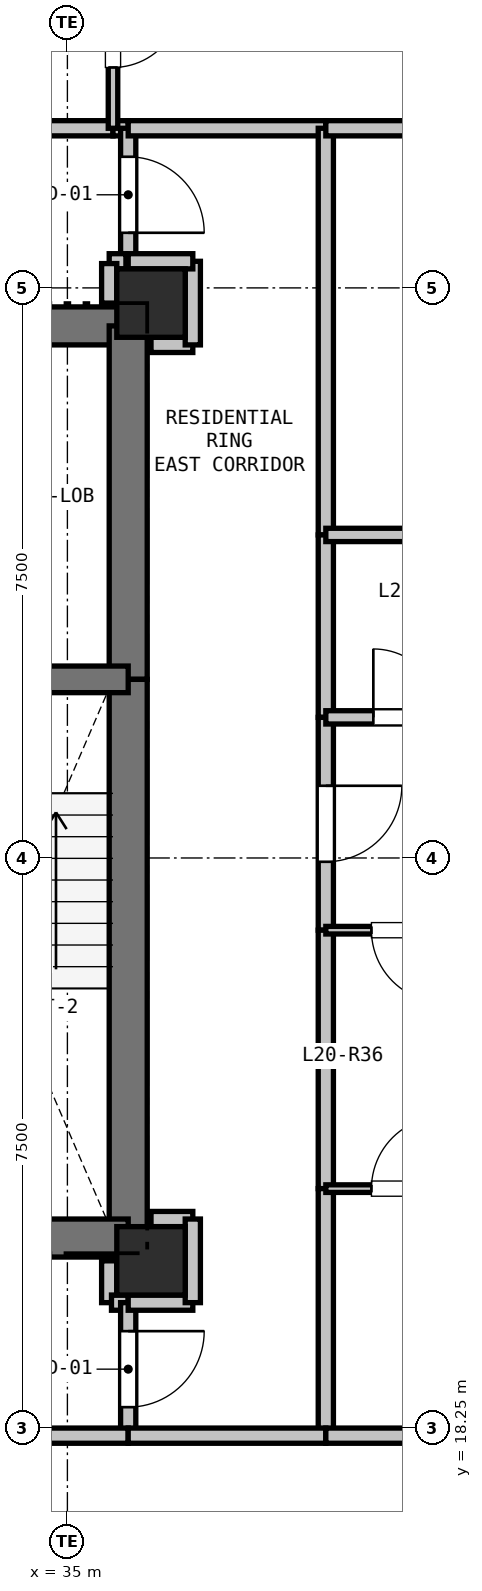
"""IFC4 building model, lengths in metres.
Left out: names, types, materials, properties, quantities, classifications, styles, units other than length and angle.
Written with IfcOpenShell. Run it as: python <this file> out.ifc"""

import sys

from ifc_helpers import new_model, si_unit, direction, frame, frame_2d, origin, origin_2d, place, context, subcontext, project, spatial, rectangle, extrude, element, fill, save


model = new_model("IFC4")
c1 = context("Model", 3, precision=1e-05, world=origin(), true_north=direction((0.0, 1.0)))
c2 = subcontext(c1, "Body", "Model", "MODEL_VIEW")
j1 = project(units=[si_unit("LENGTHUNIT", "METRE"), si_unit("PLANEANGLEUNIT", "RADIAN")], contexts=[c1])
p1 = place(None, origin())
s1 = spatial("IfcSite", under=j1, at=p1, CompositionType="ELEMENT")
p2 = place(p1, origin())
s2 = spatial("IfcBuilding", under=s1, at=p2, CompositionType="ELEMENT")
p3 = place(p2, frame((0.0, 0.0, 76.8)))
s3 = spatial("IfcBuildingStorey", under=s2, at=p3, CompositionType="ELEMENT", Elevation=76.8)
for number, where, z_axis, x_axis in (
    (1, (36.1, 33.05, 0.0), (0.0, 0.0, 1.0), (1.0, 0.0, 0.0)),
    (2, (36.1, 20.45, 0.0), (0.0, 0.0, 1.0), (1.0, 0.0, 0.0)),
):
    element("IfcColumn", number, at=place(p3, frame(where, z_axis=z_axis, x_axis=x_axis)), inside=s3, PredefinedType="COLUMN", context=c2, shape_type="SweptSolid", body=[
        extrude(rectangle(XDim=0.9, YDim=0.9, at=origin_2d()), origin(), (0.0, 0.0, 1.0), 3.3),
    ])
p4 = place(p3, frame((32.35, 32.75, 0.0), z_axis=(0.0, 0.0, 1.0), x_axis=(1.0, 0.0, 0.0)))
e3 = element("IfcWall", 3, at=p4, inside=s3, PredefinedType="SHEAR", context=c2, shape_type="SweptSolid", body=[
    extrude(rectangle(XDim=3.45, YDim=0.5, at=frame_2d((1.725, 0.0))), origin(), (0.0, 0.0, 1.0), 3.05),
])
p5 = place(p4, frame((0.65, 0.0, 0.0)))
e4 = element("IfcOpeningElement", 4, at=p5, cuts=e3, PredefinedType="OPENING", context=c2, shape_type="SweptSolid", body=[
    extrude(rectangle(XDim=1.15, YDim=2.15, at=frame_2d((0.575, 1.075))), frame((0.0, 0.26, 0.0), z_axis=(0.0, -1.0, 0.0), x_axis=(1.0, 0.0, 0.0)), (0.0, 0.0, 1.0), 0.52),
])
p6 = place(p3, frame((35.8, 32.75, 0.0), z_axis=(0.0, 0.0, 1.0), x_axis=(0.0, -1.0, 0.0)))
e5 = element("IfcWall", 5, at=p6, inside=s3, PredefinedType="SHEAR", context=c2, shape_type="SweptSolid", body=[
    extrude(rectangle(XDim=4.65, YDim=0.5, at=frame_2d((2.325, 0.0))), origin(), (0.0, 0.0, 1.0), 3.05),
])
p7 = place(p3, frame((35.8, 28.1, 0.0), z_axis=(0.0, 0.0, 1.0), x_axis=(0.0, -1.0, 0.0)))
e6 = element("IfcWall", 6, at=p7, inside=s3, PredefinedType="SHEAR", context=c2, shape_type="SweptSolid", body=[
    extrude(rectangle(XDim=7.35, YDim=0.5, at=frame_2d((3.675, 0.0))), origin(), (0.0, 0.0, 1.0), 3.05),
])
p8 = place(p3, frame((35.8, 20.75, 0.0), z_axis=(0.0, 0.0, 1.0), x_axis=(-1.0, 0.0, 0.0)))
e7 = element("IfcWall", 7, at=p8, inside=s3, PredefinedType="SHEAR", context=c2, shape_type="SweptSolid", body=[
    extrude(rectangle(XDim=3.45, YDim=0.5, at=frame_2d((1.725, 0.0))), origin(), (0.0, 0.0, 1.0), 3.05),
])
p9 = place(p3, frame((32.35, 28.1, 0.0), z_axis=(0.0, 0.0, 1.0), x_axis=(1.0, 0.0, 0.0)))
e8 = element("IfcWall", 8, at=p9, inside=s3, PredefinedType="SHEAR", context=c2, shape_type="SweptSolid", body=[
    extrude(rectangle(XDim=3.45, YDim=0.35, at=frame_2d((1.725, 0.0))), origin(), (0.0, 0.0, 1.0), 3.05),
])
p10 = place(p9, frame((1.15, 0.0, 0.0)))
e9 = element("IfcOpeningElement", 9, at=p10, cuts=e8, PredefinedType="OPENING", context=c2, shape_type="SweptSolid", body=[
    extrude(rectangle(XDim=1.15, YDim=2.15, at=frame_2d((0.575, 1.075))), frame((0.0, 0.185, 0.0), z_axis=(0.0, -1.0, 0.0), x_axis=(1.0, 0.0, 0.0)), (0.0, 0.0, 1.0), 0.37),
])
p11 = place(p3, frame((35.55, 20.45, 0.0), z_axis=(0.0, 0.0, 1.0), x_axis=(0.0, -1.0, 0.0)))
e10 = element("IfcWall", 10, at=p11, inside=s3, PredefinedType="PARTITIONING", context=c2, shape_type="SweptSolid", body=[
    extrude(rectangle(XDim=0.55, YDim=0.2, at=frame_2d((0.275, 0.0))), origin(), (0.0, 0.0, 1.0), 2.498),
])
p12 = place(p3, frame((35.58, 19.9, 0.0), z_axis=(0.0, 0.0, 1.0), x_axis=(1.0, 0.0, 0.0)))
e11 = element("IfcWall", 11, at=p12, inside=s3, PredefinedType="PARTITIONING", context=c2, shape_type="SweptSolid", body=[
    extrude(rectangle(XDim=0.22, YDim=0.2, at=frame_2d((0.11, 0.0))), origin(), (0.0, 0.0, 1.0), 3.05),
])
p13 = place(p3, frame((35.8, 19.9, 0.0), z_axis=(0.0, 0.0, 1.0), x_axis=(0.0, -1.0, 0.0)))
e12 = element("IfcWall", 12, at=p13, inside=s3, PredefinedType="PARTITIONING", context=c2, shape_type="SweptSolid", body=[
    extrude(rectangle(XDim=1.75, YDim=0.2, at=frame_2d((0.875, 0.0))), origin(), (0.0, 0.0, 1.0), 3.05),
])
p14 = place(p13, frame((0.375, 0.0, 0.0)))
e13 = element("IfcOpeningElement", 13, at=p14, cuts=e12, PredefinedType="OPENING", context=c2, shape_type="SweptSolid", body=[
    extrude(rectangle(XDim=1.0, YDim=2.15, at=frame_2d((0.5, 1.075))), frame((0.0, 0.11, 0.0), z_axis=(0.0, -1.0, 0.0), x_axis=(1.0, 0.0, 0.0)), (0.0, 0.0, 1.0), 0.22),
])
p15 = place(p3, frame((35.8, 18.15, 0.0), z_axis=(0.0, 0.0, 1.0), x_axis=(-1.0, 0.0, 0.0)))
e14 = element("IfcWall", 14, at=p15, inside=s3, PredefinedType="PARTITIONING", context=c2, shape_type="SweptSolid", body=[
    extrude(rectangle(XDim=2.2, YDim=0.2, at=frame_2d((1.1, 0.0))), origin(), (0.0, 0.0, 1.0), 3.05),
])
p16 = place(p3, frame((32.0, 35.35, 0.0), z_axis=(0.0, 0.0, 1.0), x_axis=(1.0, 0.0, 0.0)))
e15 = element("IfcWall", 15, at=p16, inside=s3, PredefinedType="PARTITIONING", context=c2, shape_type="SweptSolid", body=[
    extrude(rectangle(XDim=3.6, YDim=0.2, at=frame_2d((1.8, 0.0))), origin(), (0.0, 0.0, 1.0), 3.05),
])
p17 = place(p3, frame((35.6, 35.35, 0.0), z_axis=(0.0, 0.0, 1.0), x_axis=(1.0, 0.0, 0.0)))
e16 = element("IfcWall", 16, at=p17, inside=s3, PredefinedType="PARTITIONING", context=c2, shape_type="SweptSolid", body=[
    extrude(rectangle(XDim=0.2, YDim=0.2, at=frame_2d((0.1, 0.0))), origin(), (0.0, 0.0, 1.0), 3.05),
])
p18 = place(p3, frame((35.8, 35.35, 0.0), z_axis=(0.0, 0.0, 1.0), x_axis=(0.0, -1.0, 0.0)))
e17 = element("IfcWall", 17, at=p18, inside=s3, PredefinedType="PARTITIONING", context=c2, shape_type="SweptSolid", body=[
    extrude(rectangle(XDim=1.75, YDim=0.2, at=frame_2d((0.875, 0.0))), origin(), (0.0, 0.0, 1.0), 3.05),
])
p19 = place(p18, frame((0.375, 0.0, 0.0)))
e18 = element("IfcOpeningElement", 18, at=p19, cuts=e17, PredefinedType="OPENING", context=c2, shape_type="SweptSolid", body=[
    extrude(rectangle(XDim=1.0, YDim=2.15, at=frame_2d((0.5, 1.075))), frame((0.0, 0.11, 0.0), z_axis=(0.0, -1.0, 0.0), x_axis=(1.0, 0.0, 0.0)), (0.0, 0.0, 1.0), 0.22),
])
p20 = place(p3, frame((35.77, 33.6, 0.0), z_axis=(0.0, 0.0, 1.0), x_axis=(-1.0, 0.0, 0.0)))
e19 = element("IfcWall", 19, at=p20, inside=s3, PredefinedType="PARTITIONING", context=c2, shape_type="SweptSolid", body=[
    extrude(rectangle(XDim=0.22, YDim=0.2, at=frame_2d((0.11, 0.0))), origin(), (0.0, 0.0, 1.0), 3.05),
])
p21 = place(p3, frame((35.55, 33.57, 0.0), z_axis=(0.0, 0.0, 1.0), x_axis=(0.0, -1.0, 0.0)))
e20 = element("IfcWall", 20, at=p21, inside=s3, PredefinedType="PARTITIONING", context=c2, shape_type="SweptSolid", body=[
    extrude(rectangle(XDim=0.52, YDim=0.2, at=frame_2d((0.26, 0.0))), origin(), (0.0, 0.0, 1.0), 2.498),
])
for number, where, z_axis, x_axis in (
    (21, (36.65, 21.0, 0.0), (0.0, 0.0, 1.0), (-1.0, 0.0, 0.0)),
    (22, (36.1, 32.5, 0.0), (0.0, 0.0, 1.0), (1.0, 0.0, 0.0)),
):
    element("IfcWall", number, at=place(p3, frame(where, z_axis=z_axis, x_axis=x_axis)), inside=s3, PredefinedType="PARTITIONING", context=c2, shape_type="SweptSolid", body=[
        extrude(rectangle(XDim=0.55, YDim=0.2, at=frame_2d((0.275, 0.0))), origin(), (0.0, 0.0, 1.0), 2.498),
    ])
p22 = place(p3, frame((36.65, 32.5, 0.0), z_axis=(0.0, 0.0, 1.0), x_axis=(0.0, 1.0, 0.0)))
e23 = element("IfcWall", 23, at=p22, inside=s3, PredefinedType="PARTITIONING", context=c2, shape_type="SweptSolid", body=[
    extrude(rectangle(XDim=1.1, YDim=0.2, at=frame_2d((0.55, 0.0))), origin(), (0.0, 0.0, 1.0), 2.423),
])
p23 = place(p3, frame((36.65, 33.6, 0.0), z_axis=(0.0, 0.0, 1.0), x_axis=(-1.0, 0.0, 0.0)))
e24 = element("IfcWall", 24, at=p23, inside=s3, PredefinedType="PARTITIONING", context=c2, shape_type="SweptSolid", body=[
    extrude(rectangle(XDim=0.85, YDim=0.2, at=frame_2d((0.425, 0.0))), origin(), (0.0, 0.0, 1.0), 2.423),
])
p24 = place(p3, frame((35.8, 35.35, 0.0), z_axis=(0.0, 0.0, 1.0), x_axis=(1.0, 0.0, 0.0)))
e25 = element("IfcWall", 25, at=p24, inside=s3, PredefinedType="PARTITIONING", context=c2, shape_type="SweptSolid", body=[
    extrude(rectangle(XDim=2.6, YDim=0.2, at=frame_2d((1.3, 0.0))), origin(), (0.0, 0.0, 1.0), 2.423),
])
p25 = place(p3, frame((38.4, 35.35, 0.0), z_axis=(0.0, 0.0, 1.0), x_axis=(0.0, -1.0, 0.0)))
e26 = element("IfcWall", 26, at=p25, inside=s3, PredefinedType="PARTITIONING", context=c2, shape_type="SweptSolid", body=[
    extrude(rectangle(XDim=5.35, YDim=0.2, at=frame_2d((2.675, 0.0))), origin(), (0.0, 0.0, 1.0), 3.05),
])
p26 = place(p3, frame((38.4, 30.0, 0.0), z_axis=(0.0, 0.0, 1.0), x_axis=(0.0, -1.0, 0.0)))
e27 = element("IfcWall", 27, at=p26, inside=s3, PredefinedType="PARTITIONING", context=c2, shape_type="SweptSolid", body=[
    extrude(rectangle(XDim=2.4, YDim=0.2, at=frame_2d((1.2, 0.0))), origin(), (0.0, 0.0, 1.0), 3.05),
])
p27 = place(p3, frame((38.4, 27.6, 0.0), z_axis=(0.0, 0.0, 1.0), x_axis=(0.0, -1.0, 0.0)))
e28 = element("IfcWall", 28, at=p27, inside=s3, PredefinedType="PARTITIONING", context=c2, shape_type="SweptSolid", body=[
    extrude(rectangle(XDim=2.8, YDim=0.2, at=frame_2d((1.4, 0.0))), origin(), (0.0, 0.0, 1.0), 3.05),
])
p28 = place(p27, frame((0.9, 0.0, 0.0)))
e29 = element("IfcOpeningElement", 29, at=p28, cuts=e28, PredefinedType="OPENING", context=c2, shape_type="SweptSolid", body=[
    extrude(rectangle(XDim=1.0, YDim=2.15, at=frame_2d((0.5, 1.075))), frame((0.0, 0.11, 0.0), z_axis=(0.0, -1.0, 0.0), x_axis=(1.0, 0.0, 0.0)), (0.0, 0.0, 1.0), 0.22),
])
p29 = place(p3, frame((38.4, 24.8, 0.0), z_axis=(0.0, 0.0, 1.0), x_axis=(0.0, -1.0, 0.0)))
e30 = element("IfcWall", 30, at=p29, inside=s3, PredefinedType="PARTITIONING", context=c2, shape_type="SweptSolid", body=[
    extrude(rectangle(XDim=3.4, YDim=0.2, at=frame_2d((1.7, 0.0))), origin(), (0.0, 0.0, 1.0), 3.05),
])
p30 = place(p3, frame((38.4, 21.4, 0.0), z_axis=(0.0, 0.0, 1.0), x_axis=(0.0, -1.0, 0.0)))
e31 = element("IfcWall", 31, at=p30, inside=s3, PredefinedType="PARTITIONING", context=c2, shape_type="SweptSolid", body=[
    extrude(rectangle(XDim=3.25, YDim=0.2, at=frame_2d((1.625, 0.0))), origin(), (0.0, 0.0, 1.0), 3.05),
])
p31 = place(p3, frame((38.4, 18.15, 0.0), z_axis=(0.0, 0.0, 1.0), x_axis=(-1.0, 0.0, 0.0)))
e32 = element("IfcWall", 32, at=p31, inside=s3, PredefinedType="PARTITIONING", context=c2, shape_type="SweptSolid", body=[
    extrude(rectangle(XDim=2.6, YDim=0.2, at=frame_2d((1.3, 0.0))), origin(), (0.0, 0.0, 1.0), 2.423),
])
p32 = place(p3, frame((35.8, 19.9, 0.0), z_axis=(0.0, 0.0, 1.0), x_axis=(1.0, 0.0, 0.0)))
e33 = element("IfcWall", 33, at=p32, inside=s3, PredefinedType="PARTITIONING", context=c2, shape_type="SweptSolid", body=[
    extrude(rectangle(XDim=0.85, YDim=0.2, at=frame_2d((0.425, 0.0))), origin(), (0.0, 0.0, 1.0), 2.423),
])
p33 = place(p3, frame((36.65, 19.9, 0.0), z_axis=(0.0, 0.0, 1.0), x_axis=(0.0, 1.0, 0.0)))
e34 = element("IfcWall", 34, at=p33, inside=s3, PredefinedType="PARTITIONING", context=c2, shape_type="SweptSolid", body=[
    extrude(rectangle(XDim=1.1, YDim=0.2, at=frame_2d((0.55, 0.0))), origin(), (0.0, 0.0, 1.0), 3.05),
])
p34 = place(p3, frame((40.55, 24.8, 0.0), z_axis=(0.0, 0.0, 1.0), x_axis=(-1.0, 0.0, 0.0)))
e35 = element("IfcWall", 35, at=p34, inside=s3, PredefinedType="PARTITIONING", context=c2, shape_type="SweptSolid", body=[
    extrude(rectangle(XDim=2.15, YDim=0.1, at=frame_2d((1.075, 0.0))), origin(), (0.0, 0.0, 1.0), 3.05),
])
p35 = place(p34, frame((0.6, 0.0, 0.0)))
e36 = element("IfcOpeningElement", 36, at=p35, cuts=e35, PredefinedType="OPENING", context=c2, shape_type="SweptSolid", body=[
    extrude(rectangle(XDim=0.95, YDim=2.1, at=frame_2d((0.475, 1.05))), frame((0.0, 0.06, 0.0), z_axis=(0.0, -1.0, 0.0), x_axis=(1.0, 0.0, 0.0)), (0.0, 0.0, 1.0), 0.12),
])
p36 = place(p3, frame((38.4, 27.6, 0.0), z_axis=(0.0, 0.0, 1.0), x_axis=(1.0, 0.0, 0.0)))
e37 = element("IfcWall", 37, at=p36, inside=s3, PredefinedType="PLUMBINGWALL", context=c2, shape_type="SweptSolid", body=[
    extrude(rectangle(XDim=2.15, YDim=0.175, at=frame_2d((1.075, 0.0))), origin(), (0.0, 0.0, 1.0), 3.05),
])
p37 = place(p36, frame((0.625, 0.0, 0.0)))
e38 = element("IfcOpeningElement", 38, at=p37, cuts=e37, PredefinedType="OPENING", context=c2, shape_type="SweptSolid", body=[
    extrude(rectangle(XDim=0.9, YDim=2.1, at=frame_2d((0.45, 1.05))), frame((0.0, 0.097, 0.0), z_axis=(0.0, -1.0, 0.0), x_axis=(1.0, 0.0, 0.0)), (0.0, 0.0, 1.0), 0.195),
])
p38 = place(p3, frame((35.6, 37.85, 0.0), z_axis=(0.0, 0.0, 1.0), x_axis=(0.0, -1.0, 0.0)))
e39 = element("IfcWall", 39, at=p38, inside=s3, PredefinedType="PARTITIONING", context=c2, shape_type="SweptSolid", body=[
    extrude(rectangle(XDim=2.5, YDim=0.125, at=frame_2d((1.25, 0.0))), origin(), (0.0, 0.0, 1.0), 3.05),
])
p39 = place(p38, frame((0.8, 0.0, 0.0)))
e40 = element("IfcOpeningElement", 40, at=p39, cuts=e39, PredefinedType="OPENING", context=c2, shape_type="SweptSolid", body=[
    extrude(rectangle(XDim=0.9, YDim=2.1, at=frame_2d((0.45, 1.05))), frame((0.0, 0.073, 0.0), z_axis=(0.0, -1.0, 0.0), x_axis=(1.0, 0.0, 0.0)), (0.0, 0.0, 1.0), 0.145),
])
p40 = place(p3, frame((38.4, 18.15, 0.0), z_axis=(0.0, 0.0, 1.0), x_axis=(1.0, 0.0, 0.0)))
e41 = element("IfcWall", 41, at=p40, inside=s3, PredefinedType="PARTITIONING", context=c2, shape_type="SweptSolid", body=[
    extrude(rectangle(XDim=4.473, YDim=0.2, at=frame_2d((2.237, 0.0))), origin(), (0.0, 0.0, 1.0), 2.365),
])
p41 = place(p3, frame((38.4, 30.0, 0.0), z_axis=(0.0, 0.0, 1.0), x_axis=(1.0, 0.0, 0.0)))
e42 = element("IfcWall", 42, at=p41, inside=s3, PredefinedType="PLUMBINGWALL", context=c2, shape_type="SweptSolid", body=[
    extrude(rectangle(XDim=2.15, YDim=0.175, at=frame_2d((1.075, 0.0))), origin(), (0.0, 0.0, 1.0), 3.05),
])
p42 = place(p3, frame((38.4, 21.4, 0.0), z_axis=(0.0, 0.0, 1.0), x_axis=(1.0, 0.0, 0.0)))
e43 = element("IfcWall", 43, at=p42, inside=s3, PredefinedType="PARTITIONING", context=c2, shape_type="SweptSolid", body=[
    extrude(rectangle(XDim=2.15, YDim=0.1, at=frame_2d((1.075, 0.0))), origin(), (0.0, 0.0, 1.0), 3.05),
])
p43 = place(p42, frame((0.6, 0.0, 0.0)))
e44 = element("IfcOpeningElement", 44, at=p43, cuts=e43, PredefinedType="OPENING", context=c2, shape_type="SweptSolid", body=[
    extrude(rectangle(XDim=0.95, YDim=2.1, at=frame_2d((0.475, 1.05))), frame((0.0, 0.06, 0.0), z_axis=(0.0, -1.0, 0.0), x_axis=(1.0, 0.0, 0.0)), (0.0, 0.0, 1.0), 0.12),
])
p44 = place(p3, frame((42.873, 35.35, 0.0), z_axis=(0.0, 0.0, 1.0), x_axis=(-1.0, 0.0, 0.0)))
e45 = element("IfcWall", 45, at=p44, inside=s3, PredefinedType="PARTITIONING", context=c2, shape_type="SweptSolid", body=[
    extrude(rectangle(XDim=4.473, YDim=0.2, at=frame_2d((2.237, 0.0))), origin(), (0.0, 0.0, 1.0), 2.365),
])
p45 = place(p14, origin())
e46 = element("IfcDoor", 46, at=p45, inside=s3, OperationType="SINGLE_SWING_LEFT", PredefinedType="DOOR", context=c2, shape_type="SweptSolid", body=[
    extrude(rectangle(XDim=1.0, YDim=2.15, at=frame_2d((0.5, 1.075))), frame((0.0, 0.025, 0.0), z_axis=(0.0, -1.0, 0.0), x_axis=(1.0, 0.0, 0.0)), (0.0, 0.0, 1.0), 0.05),
])
fill(e13, e46)
p46 = place(p19, origin())
e47 = element("IfcDoor", 47, at=p46, inside=s3, OperationType="SINGLE_SWING_RIGHT", PredefinedType="DOOR", context=c2, shape_type="SweptSolid", body=[
    extrude(rectangle(XDim=1.0, YDim=2.15, at=frame_2d((0.5, 1.075))), frame((0.0, 0.025, 0.0), z_axis=(0.0, -1.0, 0.0), x_axis=(1.0, 0.0, 0.0)), (0.0, 0.0, 1.0), 0.05),
])
fill(e18, e47)
p47 = place(p28, origin())
e48 = element("IfcDoor", 48, at=p47, inside=s3, OperationType="SINGLE_SWING_LEFT", PredefinedType="DOOR", context=c2, shape_type="SweptSolid", body=[
    extrude(rectangle(XDim=1.0, YDim=2.15, at=frame_2d((0.5, 1.075))), frame((0.0, 0.025, 0.0), z_axis=(0.0, -1.0, 0.0), x_axis=(1.0, 0.0, 0.0)), (0.0, 0.0, 1.0), 0.05),
])
fill(e29, e48)
p48 = place(p37, origin())
e49 = element("IfcDoor", 49, at=p48, inside=s3, OperationType="SINGLE_SWING_LEFT", PredefinedType="DOOR", context=c2, shape_type="SweptSolid", body=[
    extrude(rectangle(XDim=0.9, YDim=2.1, at=frame_2d((0.45, 1.05))), frame((0.0, 0.025, 0.0), z_axis=(0.0, -1.0, 0.0), x_axis=(1.0, 0.0, 0.0)), (0.0, 0.0, 1.0), 0.05),
])
fill(e38, e49)
p49 = place(p35, origin())
e50 = element("IfcDoor", 50, at=p49, inside=s3, OperationType="SINGLE_SWING_LEFT", PredefinedType="DOOR", context=c2, shape_type="SweptSolid", body=[
    extrude(rectangle(XDim=0.95, YDim=2.1, at=frame_2d((0.475, 1.05))), frame((0.0, 0.025, 0.0), z_axis=(0.0, -1.0, 0.0), x_axis=(1.0, 0.0, 0.0)), (0.0, 0.0, 1.0), 0.05),
])
fill(e36, e50)
p50 = place(p43, origin())
e51 = element("IfcDoor", 51, at=p50, inside=s3, OperationType="SINGLE_SWING_RIGHT", PredefinedType="DOOR", context=c2, shape_type="SweptSolid", body=[
    extrude(rectangle(XDim=0.95, YDim=2.1, at=frame_2d((0.475, 1.05))), frame((0.0, 0.025, 0.0), z_axis=(0.0, -1.0, 0.0), x_axis=(1.0, 0.0, 0.0)), (0.0, 0.0, 1.0), 0.05),
])
fill(e44, e51)
p51 = place(p39, origin())
e52 = element("IfcDoor", 52, at=p51, inside=s3, OperationType="SINGLE_SWING_LEFT", PredefinedType="DOOR", context=c2, shape_type="SweptSolid", body=[
    extrude(rectangle(XDim=0.9, YDim=2.1, at=frame_2d((0.45, 1.05))), frame((0.0, 0.025, 0.0), z_axis=(0.0, -1.0, 0.0), x_axis=(1.0, 0.0, 0.0)), (0.0, 0.0, 1.0), 0.05),
])
fill(e40, e52)
save(model, sys.argv[1])
